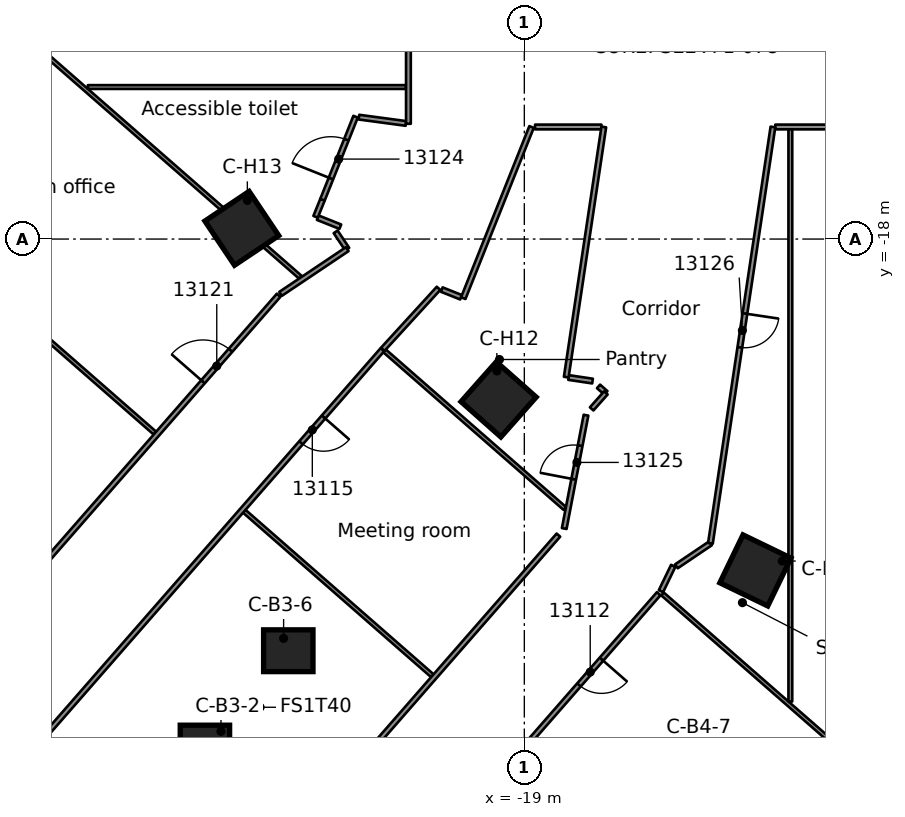
"""IFC4 building model, lengths in metres.
Left out: names, types, materials, properties, quantities, classifications, styles, units other than length and angle.
Written with IfcOpenShell. Run it as: python <this file> out.ifc"""

import sys

from ifc_helpers import new_model, si_unit, direction, frame, frame_2d, origin, origin_2d, place, context, subcontext, project, spatial, rectangle, extrude, element, fill, save


model = new_model("IFC4")
c1 = context("Model", 3, precision=1e-05, world=origin(), true_north=direction((0.0, 1.0)))
c2 = subcontext(c1, "Body", "Model", "MODEL_VIEW")
j1 = project(units=[si_unit("LENGTHUNIT", "METRE"), si_unit("PLANEANGLEUNIT", "RADIAN")], contexts=[c1])
p1 = place(None, origin())
s1 = spatial("IfcSite", under=j1, at=p1, CompositionType="ELEMENT")
p2 = place(p1, origin())
s2 = spatial("IfcBuilding", under=s1, at=p2, CompositionType="ELEMENT")
p3 = place(p2, frame((0.0, 0.0, 62.3)))
s3 = spatial("IfcBuildingStorey", under=s2, at=p3, CompositionType="ELEMENT", Elevation=62.3)
for number, where, z_axis, x_axis in (
    (1, (-27.405, -31.341, 0.0), (0.0, 0.0, 1.0), (1.0, 0.0, 0.0)),
    (2, (-25.211, -28.832, 0.0), (0.0, 0.0, 1.0), (1.0, 0.0, 0.0)),
):
    element("IfcColumn", number, at=place(p3, frame(where, z_axis=z_axis, x_axis=x_axis)), inside=s3, PredefinedType="COLUMN", context=c2, shape_type="SweptSolid", body=[
        extrude(rectangle(XDim=1.3, YDim=1.1, at=origin_2d()), origin(), (0.0, 0.0, 1.0), 3.5),
    ])
for number, where, z_axis, x_axis in (
    (3, (-12.92, -26.719, 0.0), (0.0, 0.0, 1.0), (-0.435, -0.9, 0.0)),
    (4, (-19.677, -22.219, 0.0), (0.0, 0.0, 1.0), (-0.663, -0.749, 0.0)),
    (5, (-26.434, -17.718, 0.0), (0.0, 0.0, 1.0), (-0.831, -0.557, 0.0)),
):
    element("IfcColumn", number, at=place(p3, frame(where, z_axis=z_axis, x_axis=x_axis)), inside=s3, PredefinedType="COLUMN", context=c2, shape_type="SweptSolid", body=[
        extrude(rectangle(XDim=1.4, YDim=1.4, at=origin_2d()), origin(), (0.0, 0.0, 1.0), 3.5),
    ])
p4 = place(p3, frame((-23.965, -17.81, 0.0), z_axis=(0.0, 0.0, 1.0), x_axis=(0.55613676815, -0.831090786323, 0.0)))
e6 = element("IfcWall", 6, at=p4, inside=s3, PredefinedType="PARTITIONING", context=c2, shape_type="SweptSolid", body=[
    extrude(rectangle(XDim=0.549, YDim=0.125, at=frame_2d((0.274, 0.0))), origin(), (0.0, 0.0, 1.0), 3.08),
])
p5 = place(p3, frame((-17.047, -21.877, 0.0), z_axis=(0.0, 0.0, 1.0), x_axis=(0.748400306253, -0.663247300485, 0.0)))
e7 = element("IfcWall", 7, at=p5, inside=s3, PredefinedType="PARTITIONING", context=c2, shape_type="SweptSolid", body=[
    extrude(rectangle(XDim=0.258, YDim=0.125, at=frame_2d((0.129, 0.0))), origin(), (0.0, 0.0, 1.0), 3.08),
])
p6 = place(p3, frame((-39.139, -13.997, 0.0), z_axis=(0.0, 0.0, 1.0), x_axis=(0.752825840036, -0.65821976161, 0.0)))
e8 = element("IfcWall", 8, at=p6, inside=s3, PredefinedType="PARTITIONING", context=c2, shape_type="SweptSolid", body=[
    extrude(rectangle(XDim=13.837, YDim=0.1, at=frame_2d((6.918, 0.0))), origin(), (0.0, 0.0, 1.0), 3.08),
])
p7 = place(p3, frame((-26.369, -25.163, 0.0), z_axis=(0.0, 0.0, 1.0), x_axis=(0.752836606275, -0.658207447734, 0.0)))
e9 = element("IfcWall", 9, at=p7, inside=s3, PredefinedType="PARTITIONING", context=c2, shape_type="SweptSolid", body=[
    extrude(rectangle(XDim=6.574, YDim=0.1, at=frame_2d((3.287, 0.0))), origin(), (0.0, 0.0, 1.0), 3.08),
])
p8 = place(p3, frame((-35.448, -9.776, 0.0), z_axis=(0.0, 0.0, 1.0), x_axis=(0.752812898316, -0.658234563153, 0.0)))
e10 = element("IfcWall", 10, at=p8, inside=s3, PredefinedType="PARTITIONING", context=c2, shape_type="SweptSolid", body=[
    extrude(rectangle(XDim=14.019, YDim=0.1, at=frame_2d((7.01, 0.0))), origin(), (0.0, 0.0, 1.0), 3.08),
])
p9 = place(p3, frame((-22.678, -20.942, 0.0), z_axis=(0.0, 0.0, 1.0), x_axis=(0.752838405923, -0.658205389349, 0.0)))
e11 = element("IfcWall", 11, at=p9, inside=s3, PredefinedType="PARTITIONING", context=c2, shape_type="SweptSolid", body=[
    extrude(rectangle(XDim=6.297, YDim=0.1, at=frame_2d((3.149, 0.0))), origin(), (0.0, 0.0, 1.0), 3.08),
])
p10 = place(p3, frame((-15.364, -27.338, 0.0), z_axis=(0.0, 0.0, 1.0), x_axis=(0.752870986554, -0.658168122599, 0.0)))
e12 = element("IfcWall", 12, at=p10, inside=s3, PredefinedType="PARTITIONING", context=c2, shape_type="SweptSolid", body=[
    extrude(rectangle(XDim=13.821, YDim=0.1, at=frame_2d((6.91, 0.0))), origin(), (0.0, 0.0, 1.0), 3.08),
])
p11 = place(p3, frame((-24.435, -17.438, 0.0), z_axis=(0.0, 0.0, 1.0), x_axis=(0.928555762044, -0.3711929374, 0.0)))
e13 = element("IfcWall", 13, at=p11, inside=s3, PredefinedType="PARTITIONING", context=c2, shape_type="SweptSolid", body=[
    extrude(rectangle(XDim=0.639, YDim=0.125, at=frame_2d((0.319, 0.0))), origin(), (0.0, 0.0, 1.0), 3.08),
])
p12 = place(p3, frame((-21.173, -19.329, 0.0), z_axis=(0.0, 0.0, 1.0), x_axis=(0.928691976307, -0.37085200976, 0.0)))
e14 = element("IfcWall", 14, at=p12, inside=s3, PredefinedType="PARTITIONING", context=c2, shape_type="SweptSolid", body=[
    extrude(rectangle(XDim=0.547, YDim=0.125, at=frame_2d((0.273, 0.0))), origin(), (0.0, 0.0, 1.0), 3.08),
])
p13 = place(p3, frame((-14.998, -26.611, 0.0), z_axis=(0.0, 0.0, 1.0), x_axis=(0.828906337017, 0.559387418926, 0.0)))
e15 = element("IfcWall", 15, at=p13, inside=s3, PredefinedType="PARTITIONING", context=c2, shape_type="SweptSolid", body=[
    extrude(rectangle(XDim=1.08, YDim=0.125, at=frame_2d((0.54, 0.0))), origin(), (0.0, 0.0, 1.0), 3.08),
])
p14 = place(p3, frame((-17.835, -21.643, 0.0), z_axis=(0.0, 0.0, 1.0), x_axis=(0.989048543556, -0.147590577236, 0.0)))
e16 = element("IfcWall", 16, at=p14, inside=s3, PredefinedType="PARTITIONING", context=c2, shape_type="SweptSolid", body=[
    extrude(rectangle(XDim=0.637, YDim=0.125, at=frame_2d((0.318, 0.0))), origin(), (0.0, 0.0, 1.0), 3.08),
])
p15 = place(p3, frame((-23.353, -14.792, 0.0), z_axis=(0.0, 0.0, 1.0), x_axis=(0.991114791297, -0.133009287168, 0.0)))
e17 = element("IfcWall", 17, at=p15, inside=s3, PredefinedType="PARTITIONING", context=c2, shape_type="SweptSolid", body=[
    extrude(rectangle(XDim=1.248, YDim=0.125, at=frame_2d((0.624, 0.0))), origin(), (0.0, 0.0, 1.0), 3.08),
])
p16 = place(p3, frame((-18.718, -15.051, 0.0), z_axis=(0.0, 0.0, 1.0), x_axis=(1.0, 0.0, 0.0)))
e18 = element("IfcWall", 18, at=p16, inside=s3, PredefinedType="PARTITIONING", context=c2, shape_type="SweptSolid", body=[
    extrude(rectangle(XDim=1.747, YDim=0.125, at=frame_2d((0.874, 0.0))), origin(), (0.0, 0.0, 1.0), 3.08),
])
p17 = place(p3, frame((-12.396, -15.051, 0.0), z_axis=(0.0, 0.0, 1.0), x_axis=(1.0, 0.0, 0.0)))
e19 = element("IfcWall", 19, at=p17, inside=s3, PredefinedType="PARTITIONING", context=c2, shape_type="SweptSolid", body=[
    extrude(rectangle(XDim=1.405, YDim=0.125, at=frame_2d((0.703, 0.0))), origin(), (0.0, 0.0, 1.0), 3.08),
])
p18 = place(p3, frame((-30.485, -14.0, 0.0), z_axis=(0.0, 0.0, 1.0), x_axis=(1.0, 0.0, 0.0)))
e20 = element("IfcWall", 20, at=p18, inside=s3, PredefinedType="PARTITIONING", context=c2, shape_type="SweptSolid", body=[
    extrude(rectangle(XDim=8.372, YDim=0.1, at=frame_2d((4.186, 0.0))), origin(), (0.0, 0.0, 1.0), 3.08),
])
p19 = place(p3, frame((-23.66, -18.266, 0.0), z_axis=(0.0, 0.0, 1.0), x_axis=(-0.83066036782, -0.556779447658, 0.0)))
e21 = element("IfcWall", 21, at=p19, inside=s3, PredefinedType="PARTITIONING", context=c2, shape_type="SweptSolid", body=[
    extrude(rectangle(XDim=2.112, YDim=0.125, at=frame_2d((1.056, 0.0))), origin(), (0.0, 0.0, 1.0), 3.08),
])
p20 = place(p3, frame((-22.725, -20.901, 0.0), z_axis=(0.0, 0.0, 1.0), x_axis=(0.674921155875, 0.737889851775, 0.0)))
e22 = element("IfcWall", 22, at=p20, inside=s3, PredefinedType="PARTITIONING", context=c2, shape_type="SweptSolid", body=[
    extrude(rectangle(XDim=2.175, YDim=0.125, at=frame_2d((1.087, 0.0))), origin(), (0.0, 0.0, 1.0), 3.08),
])
p21 = place(p3, frame((-17.228, -22.469, 0.0), z_axis=(0.0, 0.0, 1.0), x_axis=(0.664256182607, 0.747504999226, 0.0)))
e23 = element("IfcWall", 23, at=p21, inside=s3, PredefinedType="PARTITIONING", context=c2, shape_type="SweptSolid", body=[
    extrude(rectangle(XDim=0.563, YDim=0.125, at=frame_2d((0.281, 0.0))), origin(), (0.0, 0.0, 1.0), 3.08),
])
p22 = place(p3, frame((-15.464, -27.332, 0.0), z_axis=(0.0, 0.0, 1.0), x_axis=(-0.658219577617, -0.752826000907, 0.0)))
e24 = element("IfcWall", 24, at=p22, inside=s3, PredefinedType="PARTITIONING", context=c2, shape_type="SweptSolid", body=[
    extrude(rectangle(XDim=24.745, YDim=0.125, at=frame_2d((12.373, 0.0))), origin(), (0.0, 0.0, 1.0), 3.08),
])
p23 = place(p22, frame((2.288, 0.0, 0.0)))
e25 = element("IfcOpeningElement", 25, at=p23, cuts=e24, PredefinedType="OPENING", context=c2, shape_type="SweptSolid", body=[
    extrude(rectangle(XDim=0.9, YDim=2.1, at=frame_2d((0.45, 1.05))), frame((0.0, 0.073, 0.0), z_axis=(0.0, -1.0, 0.0), x_axis=(1.0, 0.0, 0.0)), (0.0, 0.0, 1.0), 0.145),
])
p24 = place(p22, frame((8.645, 0.0, 0.0)))
e26 = element("IfcOpeningElement", 26, at=p24, cuts=e24, PredefinedType="OPENING", context=c2, shape_type="SweptSolid", body=[
    extrude(rectangle(XDim=0.9, YDim=2.1, at=frame_2d((0.45, 1.05))), frame((0.0, 0.073, 0.0), z_axis=(0.0, -1.0, 0.0), x_axis=(1.0, 0.0, 0.0)), (0.0, 0.0, 1.0), 0.145),
])
p25 = place(p22, frame((15.646, 0.0, 0.0)))
e27 = element("IfcOpeningElement", 27, at=p25, cuts=e24, PredefinedType="OPENING", context=c2, shape_type="SweptSolid", body=[
    extrude(rectangle(XDim=0.9, YDim=2.1, at=frame_2d((0.45, 1.05))), frame((0.0, 0.073, 0.0), z_axis=(0.0, -1.0, 0.0), x_axis=(1.0, 0.0, 0.0)), (0.0, 0.0, 1.0), 0.145),
])
p26 = place(p22, frame((21.645, 0.0, 0.0)))
e28 = element("IfcOpeningElement", 28, at=p26, cuts=e24, PredefinedType="OPENING", context=c2, shape_type="SweptSolid", body=[
    extrude(rectangle(XDim=0.9, YDim=2.1, at=frame_2d((0.45, 1.05))), frame((0.0, 0.073, 0.0), z_axis=(0.0, -1.0, 0.0), x_axis=(1.0, 0.0, 0.0)), (0.0, 0.0, 1.0), 0.145),
])
p27 = place(p3, frame((-32.036, -41.726, 0.0), z_axis=(0.0, 0.0, 1.0), x_axis=(0.658205705433, 0.75283812957, 0.0)))
e29 = element("IfcWall", 29, at=p27, inside=s3, PredefinedType="PARTITIONING", context=c2, shape_type="SweptSolid", body=[
    extrude(rectangle(XDim=21.168, YDim=0.125, at=frame_2d((10.584, 0.0))), origin(), (0.0, 0.0, 1.0), 3.08),
])
p28 = place(p27, frame((8.798, 0.0, 0.0)))
e30 = element("IfcOpeningElement", 30, at=p28, cuts=e29, PredefinedType="OPENING", context=c2, shape_type="SweptSolid", body=[
    extrude(rectangle(XDim=0.9, YDim=2.1, at=frame_2d((0.45, 1.05))), frame((0.0, 0.073, 0.0), z_axis=(0.0, -1.0, 0.0), x_axis=(1.0, 0.0, 0.0)), (0.0, 0.0, 1.0), 0.145),
])
p29 = place(p3, frame((-22.736, -20.913, 0.0), z_axis=(0.0, 0.0, 1.0), x_axis=(-0.658236458127, -0.752811241409, 0.0)))
e31 = element("IfcWall", 31, at=p29, inside=s3, PredefinedType="PARTITIONING", context=c2, shape_type="SweptSolid", body=[
    extrude(rectangle(XDim=21.79, YDim=0.125, at=frame_2d((10.895, 0.0))), origin(), (0.0, 0.0, 1.0), 3.08),
])
p30 = place(p29, frame((2.35, 0.0, 0.0)))
e32 = element("IfcOpeningElement", 32, at=p30, cuts=e31, PredefinedType="OPENING", context=c2, shape_type="SweptSolid", body=[
    extrude(rectangle(XDim=0.9, YDim=2.1, at=frame_2d((0.45, 1.05))), frame((0.0, 0.073, 0.0), z_axis=(0.0, -1.0, 0.0), x_axis=(1.0, 0.0, 0.0)), (0.0, 0.0, 1.0), 0.145),
])
p31 = place(p3, frame((-41.314, -37.6, 0.0), z_axis=(0.0, 0.0, 1.0), x_axis=(0.658340906106, 0.752719902319, 0.0)))
e33 = element("IfcWall", 33, at=p31, inside=s3, PredefinedType="PARTITIONING", context=c2, shape_type="SweptSolid", body=[
    extrude(rectangle(XDim=24.075, YDim=0.125, at=frame_2d((12.038, 0.0))), origin(), (0.0, 0.0, 1.0), 3.08),
])
p32 = place(p31, frame((21.051, 0.0, 0.0)))
e34 = element("IfcOpeningElement", 34, at=p32, cuts=e33, PredefinedType="OPENING", context=c2, shape_type="SweptSolid", body=[
    extrude(rectangle(XDim=1.1, YDim=2.1, at=frame_2d((0.55, 1.05))), frame((0.0, 0.073, 0.0), z_axis=(0.0, -1.0, 0.0), x_axis=(1.0, 0.0, 0.0)), (0.0, 0.0, 1.0), 0.145),
])
p33 = place(p31, frame((11.3, 0.0, 0.0)))
e35 = element("IfcOpeningElement", 35, at=p33, cuts=e33, PredefinedType="OPENING", context=c2, shape_type="SweptSolid", body=[
    extrude(rectangle(XDim=1.8, YDim=2.1, at=frame_2d((0.9, 1.05))), frame((0.0, 0.073, 0.0), z_axis=(0.0, -1.0, 0.0), x_axis=(1.0, 0.0, 0.0)), (0.0, 0.0, 1.0), 0.145),
])
p34 = place(p3, frame((-15.405, -27.266, 0.0), z_axis=(0.0, 0.0, 1.0), x_axis=(0.435199770088, 0.900333915897, 0.0)))
e36 = element("IfcWall", 36, at=p34, inside=s3, PredefinedType="PARTITIONING", context=c2, shape_type="SweptSolid", body=[
    extrude(rectangle(XDim=0.742, YDim=0.125, at=frame_2d((0.371, 0.0))), origin(), (0.0, 0.0, 1.0), 3.08),
])
p35 = place(p3, frame((-24.493, -17.415, 0.0), z_axis=(0.0, 0.0, 1.0), x_axis=(0.374072822582, 0.9273993333, 0.0)))
e37 = element("IfcWall", 37, at=p35, inside=s3, PredefinedType="PARTITIONING", context=c2, shape_type="SweptSolid", body=[
    extrude(rectangle(XDim=0.486, YDim=0.125, at=frame_2d((0.243, 0.0))), origin(), (0.0, 0.0, 1.0), 3.08),
])
p36 = place(p3, frame((-18.81, -15.051, 0.0), z_axis=(0.0, 0.0, 1.0), x_axis=(-0.370557189756, -0.928809651715, 0.0)))
e38 = element("IfcWall", 38, at=p36, inside=s3, PredefinedType="PARTITIONING", context=c2, shape_type="SweptSolid", body=[
    extrude(rectangle(XDim=4.849, YDim=0.125, at=frame_2d((2.425, 0.0))), origin(), (0.0, 0.0, 1.0), 3.08),
])
p37 = place(p3, frame((-24.311, -16.964, 0.0), z_axis=(0.0, 0.0, 1.0), x_axis=(0.370459614681, 0.928848574252, 0.0)))
e39 = element("IfcWall", 39, at=p37, inside=s3, PredefinedType="PARTITIONING", context=c2, shape_type="SweptSolid", body=[
    extrude(rectangle(XDim=2.351, YDim=0.125, at=frame_2d((1.176, 0.0))), origin(), (0.0, 0.0, 1.0), 3.08),
])
p38 = place(p37, frame((0.6, 0.0, 0.0)))
e40 = element("IfcOpeningElement", 40, at=p38, cuts=e39, PredefinedType="OPENING", context=c2, shape_type="SweptSolid", body=[
    extrude(rectangle(XDim=1.1, YDim=2.1, at=frame_2d((0.55, 1.05))), frame((0.0, 0.073, 0.0), z_axis=(0.0, -1.0, 0.0), x_axis=(1.0, 0.0, 0.0)), (0.0, 0.0, 1.0), 0.145),
])
p39 = place(p3, frame((-17.95, -25.617, 0.0), z_axis=(0.0, 0.0, 1.0), x_axis=(0.188644670049, 0.982045410591, 0.0)))
e41 = element("IfcWall", 41, at=p39, inside=s3, PredefinedType="PARTITIONING", context=c2, shape_type="SweptSolid", body=[
    extrude(rectangle(XDim=3.037, YDim=0.125, at=frame_2d((1.519, 0.0))), origin(), (0.0, 0.0, 1.0), 3.08),
])
p40 = place(p39, frame((1.322, 0.0, 0.0)))
e42 = element("IfcOpeningElement", 42, at=p40, cuts=e41, PredefinedType="OPENING", context=c2, shape_type="SweptSolid", body=[
    extrude(rectangle(XDim=0.9, YDim=2.1, at=frame_2d((0.45, 1.05))), frame((0.0, 0.073, 0.0), z_axis=(0.0, -1.0, 0.0), x_axis=(1.0, 0.0, 0.0)), (0.0, 0.0, 1.0), 0.145),
])
p41 = place(p3, frame((-16.909, -15.051, 0.0), z_axis=(0.0, 0.0, 1.0), x_axis=(-0.148448073616, -0.988920203778, 0.0)))
e43 = element("IfcWall", 43, at=p41, inside=s3, PredefinedType="PARTITIONING", context=c2, shape_type="SweptSolid", body=[
    extrude(rectangle(XDim=6.656, YDim=0.125, at=frame_2d((3.328, 0.0))), origin(), (0.0, 0.0, 1.0), 3.08),
])
p42 = place(p3, frame((-12.458, -15.051, 0.0), z_axis=(0.0, 0.0, 1.0), x_axis=(-0.148482692609, -0.988915006457, 0.0)))
e44 = element("IfcWall", 44, at=p42, inside=s3, PredefinedType="PARTITIONING", context=c2, shape_type="SweptSolid", body=[
    extrude(rectangle(XDim=11.079, YDim=0.125, at=frame_2d((5.54, 0.0))), origin(), (0.0, 0.0, 1.0), 3.08),
])
p43 = place(p42, frame((4.964, 0.0, 0.0)))
e45 = element("IfcOpeningElement", 45, at=p43, cuts=e44, PredefinedType="OPENING", context=c2, shape_type="SweptSolid", body=[
    extrude(rectangle(XDim=0.9, YDim=2.1, at=frame_2d((0.45, 1.05))), frame((0.0, 0.073, 0.0), z_axis=(0.0, -1.0, 0.0), x_axis=(1.0, 0.0, 0.0)), (0.0, 0.0, 1.0), 0.145),
])
p44 = place(p3, frame((-12.0, -30.169, 0.0), z_axis=(0.0, 0.0, 1.0), x_axis=(0.0, 1.0, 0.0)))
e46 = element("IfcWall", 46, at=p44, inside=s3, PredefinedType="PARTITIONING", context=c2, shape_type="SweptSolid", body=[
    extrude(rectangle(XDim=15.055, YDim=0.1, at=frame_2d((7.527, 0.0))), origin(), (0.0, 0.0, 1.0), 3.08),
])
p45 = place(p3, frame((-22.05, -14.967, 0.0), z_axis=(0.0, 0.0, 1.0), x_axis=(0.0, 1.0, 0.0)))
e47 = element("IfcWall", 47, at=p45, inside=s3, PredefinedType="PARTITIONING", context=c2, shape_type="SweptSolid", body=[
    extrude(rectangle(XDim=30.018, YDim=0.125, at=frame_2d((15.009, 0.0))), origin(), (0.0, 0.0, 1.0), 3.08),
])
p46 = place(p45, frame((7.317, 0.0, 0.0)))
e48 = element("IfcOpeningElement", 48, at=p46, cuts=e47, PredefinedType="OPENING", context=c2, shape_type="SweptSolid", body=[
    extrude(rectangle(XDim=1.8, YDim=2.1, at=frame_2d((0.9, 1.05))), frame((0.0, 0.073, 0.0), z_axis=(0.0, -1.0, 0.0), x_axis=(1.0, 0.0, 0.0)), (0.0, 0.0, 1.0), 0.145),
])
p47 = place(p45, frame((18.591, 0.0, 0.0)))
e49 = element("IfcOpeningElement", 49, at=p47, cuts=e47, PredefinedType="OPENING", context=c2, shape_type="SweptSolid", body=[
    extrude(rectangle(XDim=1.1, YDim=2.1, at=frame_2d((0.55, 1.05))), frame((0.0, 0.073, 0.0), z_axis=(0.0, -1.0, 0.0), x_axis=(1.0, 0.0, 0.0)), (0.0, 0.0, 1.0), 0.145),
])
p48 = place(p23, origin())
e50 = element("IfcDoor", 50, at=p48, inside=s3, OperationType="SINGLE_SWING_LEFT", PredefinedType="DOOR", context=c2, shape_type="SweptSolid", body=[
    extrude(rectangle(XDim=0.9, YDim=2.1, at=frame_2d((0.45, 1.05))), frame((0.0, 0.025, 0.0), z_axis=(0.0, -1.0, 0.0), x_axis=(1.0, 0.0, 0.0)), (0.0, 0.0, 1.0), 0.05),
])
fill(e25, e50)
p49 = place(p30, origin())
e51 = element("IfcDoor", 51, at=p49, inside=s3, OperationType="SINGLE_SWING_LEFT", PredefinedType="DOOR", context=c2, shape_type="SweptSolid", body=[
    extrude(rectangle(XDim=0.9, YDim=2.1, at=frame_2d((0.45, 1.05))), frame((0.0, 0.025, 0.0), z_axis=(0.0, -1.0, 0.0), x_axis=(1.0, 0.0, 0.0)), (0.0, 0.0, 1.0), 0.05),
])
fill(e32, e51)
p50 = place(p32, origin())
e52 = element("IfcDoor", 52, at=p50, inside=s3, OperationType="SINGLE_SWING_RIGHT", PredefinedType="DOOR", context=c2, shape_type="SweptSolid", body=[
    extrude(rectangle(XDim=1.1, YDim=2.1, at=frame_2d((0.55, 1.05))), frame((0.0, 0.025, 0.0), z_axis=(0.0, -1.0, 0.0), x_axis=(1.0, 0.0, 0.0)), (0.0, 0.0, 1.0), 0.05),
])
fill(e34, e52)
p51 = place(p38, origin())
e53 = element("IfcDoor", 53, at=p51, inside=s3, OperationType="SINGLE_SWING_LEFT", PredefinedType="DOOR", context=c2, shape_type="SweptSolid", body=[
    extrude(rectangle(XDim=1.1, YDim=2.1, at=frame_2d((0.55, 1.05))), frame((0.0, 0.025, 0.0), z_axis=(0.0, -1.0, 0.0), x_axis=(1.0, 0.0, 0.0)), (0.0, 0.0, 1.0), 0.05),
])
fill(e40, e53)
p52 = place(p40, origin())
e54 = element("IfcDoor", 54, at=p52, inside=s3, OperationType="SINGLE_SWING_RIGHT", PredefinedType="DOOR", context=c2, shape_type="SweptSolid", body=[
    extrude(rectangle(XDim=0.9, YDim=2.1, at=frame_2d((0.45, 1.05))), frame((0.0, 0.025, 0.0), z_axis=(0.0, -1.0, 0.0), x_axis=(1.0, 0.0, 0.0)), (0.0, 0.0, 1.0), 0.05),
])
fill(e42, e54)
p53 = place(p43, origin())
e55 = element("IfcDoor", 55, at=p53, inside=s3, OperationType="SINGLE_SWING_LEFT", PredefinedType="DOOR", context=c2, shape_type="SweptSolid", body=[
    extrude(rectangle(XDim=0.9, YDim=2.1, at=frame_2d((0.45, 1.05))), frame((0.0, 0.025, 0.0), z_axis=(0.0, -1.0, 0.0), x_axis=(1.0, 0.0, 0.0)), (0.0, 0.0, 1.0), 0.05),
])
fill(e45, e55)
save(model, sys.argv[1])
